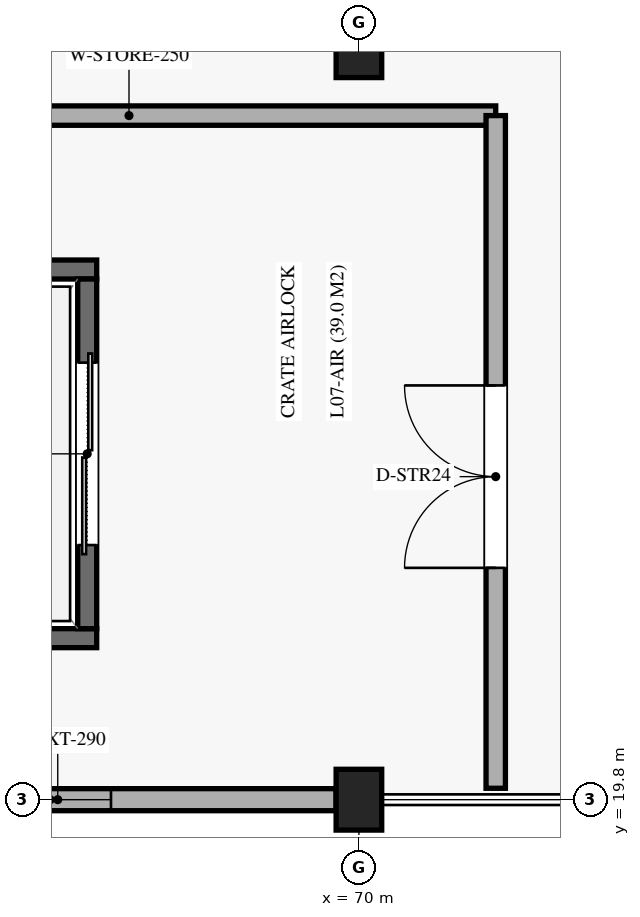
"""IFC4 building model, lengths in metres.
Left out: names, types, materials, properties, quantities, classifications, styles, units other than length and angle.
Written with IfcOpenShell. Run it as: python <this file> out.ifc"""

import sys

from ifc_helpers import new_model, si_unit, direction, frame, frame_2d, origin, origin_2d, place, context, subcontext, project, spatial, rectangle, extrude, element, fill, save


model = new_model("IFC4")
c1 = context("Model", 3, precision=1e-05, world=origin(), true_north=direction((0.0, 1.0)))
c2 = subcontext(c1, "Body", "Model", "MODEL_VIEW")
j1 = project(units=[si_unit("LENGTHUNIT", "METRE"), si_unit("PLANEANGLEUNIT", "RADIAN")], contexts=[c1])
p1 = place(None, origin())
s1 = spatial("IfcSite", under=j1, at=p1, CompositionType="ELEMENT")
p2 = place(p1, origin())
s2 = spatial("IfcBuilding", under=s1, at=p2, CompositionType="ELEMENT")
p3 = place(p2, frame((0.0, 0.0, 37.74)))
s3 = spatial("IfcBuildingStorey", under=s2, at=p3, CompositionType="ELEMENT", Elevation=37.74)
for number, where, z_axis, x_axis in (
    (1, (70.0, 19.8, 0.0), (0.0, 0.0, 1.0), (1.0, 0.0, 0.0)),
    (2, (70.0, 29.7, 0.0), (0.0, 0.0, 1.0), (1.0, 0.0, 0.0)),
):
    element("IfcColumn", number, at=place(p3, frame(where, z_axis=z_axis, x_axis=x_axis)), inside=s3, PredefinedType="COLUMN", context=c2, shape_type="SweptSolid", body=[
        extrude(rectangle(XDim=0.6, YDim=0.8, at=origin_2d()), origin(), (0.0, 0.0, 1.0), 4.59),
    ])
p4 = place(p3, frame((62.375, 19.8, 0.0), z_axis=(0.0, 0.0, 1.0), x_axis=(1.0, 0.0, 0.0)))
e3 = element("IfcWall", 3, at=p4, inside=s3, PredefinedType="SOLIDWALL", context=c2, shape_type="SweptSolid", body=[
    extrude(rectangle(XDim=7.325, YDim=0.29, at=frame_2d((3.663, 0.0))), origin(), (0.0, 0.0, 1.0), 3.53),
])
p5 = place(p4, frame((2.763, 0.0, 1.05)))
e4 = element("IfcOpeningElement", 4, at=p5, cuts=e3, PredefinedType="OPENING", context=c2, shape_type="SweptSolid", body=[
    extrude(rectangle(XDim=1.6, YDim=1.65, at=frame_2d((0.8, 0.825))), frame((0.0, 0.155, 0.0), z_axis=(0.0, -1.0, 0.0), x_axis=(1.0, 0.0, 0.0)), (0.0, 0.0, 1.0), 0.31),
])
for number, where, z_axis, x_axis in (
    (5, (62.65, 21.925, 0.0), (0.0, 0.0, 1.0), (1.0, 0.0, 0.0)),
    (6, (62.65, 26.775, 0.0), (0.0, 0.0, 1.0), (1.0, 0.0, 0.0)),
):
    element("IfcWall", number, at=place(p3, frame(where, z_axis=z_axis, x_axis=x_axis)), inside=s3, PredefinedType="SOLIDWALL", context=c2, shape_type="SweptSolid", body=[
        extrude(rectangle(XDim=3.9, YDim=0.25, at=frame_2d((1.95, 0.0))), origin(), (0.0, 0.0, 1.0), 4.29),
    ])
p6 = place(p3, frame((66.425, 22.05, 0.0), z_axis=(0.0, 0.0, 1.0), x_axis=(0.0, 1.0, 0.0)))
e7 = element("IfcWall", 7, at=p6, inside=s3, PredefinedType="SOLIDWALL", context=c2, shape_type="SweptSolid", body=[
    extrude(rectangle(XDim=4.6, YDim=0.25, at=frame_2d((2.3, 0.0))), origin(), (0.0, 0.0, 1.0), 4.29),
])
p7 = place(p6, frame((1.1, 0.0, 0.0)))
e8 = element("IfcOpeningElement", 8, at=p7, cuts=e7, PredefinedType="OPENING", context=c2, shape_type="SweptSolid", body=[
    extrude(rectangle(XDim=2.4, YDim=2.65, at=frame_2d((1.2, 1.325))), frame((0.0, 0.135, 0.0), z_axis=(0.0, -1.0, 0.0), x_axis=(1.0, 0.0, 0.0)), (0.0, 0.0, 1.0), 0.27),
])
p8 = place(p3, frame((62.15, 28.8, 0.0), z_axis=(0.0, 0.0, 1.0), x_axis=(1.0, 0.0, 0.0)))
e9 = element("IfcWall", 9, at=p8, inside=s3, PredefinedType="SOLIDWALL", context=c2, shape_type="SweptSolid", body=[
    extrude(rectangle(XDim=9.65, YDim=0.255, at=frame_2d((4.825, 0.0))), origin(), (0.0, 0.0, 1.0), 3.43),
])
p9 = place(p3, frame((71.8, 19.95, 0.0), z_axis=(0.0, 0.0, 1.0), x_axis=(0.0, 1.0, 0.0)))
e10 = element("IfcWall", 10, at=p9, inside=s3, PredefinedType="SOLIDWALL", context=c2, shape_type="SweptSolid", body=[
    extrude(rectangle(XDim=8.85, YDim=0.255, at=frame_2d((4.425, 0.0))), origin(), (0.0, 0.0, 1.0), 3.43),
])
p10 = place(p9, frame((2.9, 0.0, 0.0)))
e11 = element("IfcOpeningElement", 11, at=p10, cuts=e10, PredefinedType="OPENING", context=c2, shape_type="SweptSolid", body=[
    extrude(rectangle(XDim=2.4, YDim=2.5, at=frame_2d((1.2, 1.25))), frame((0.0, 0.137, 0.0), z_axis=(0.0, -1.0, 0.0), x_axis=(1.0, 0.0, 0.0)), (0.0, 0.0, 1.0), 0.275),
])
p11 = place(p5, origin())
e12 = element("IfcWindow", 12, at=p11, inside=s3, PartitioningType="SINGLE_PANEL", PredefinedType="WINDOW", context=c2, shape_type="SweptSolid", body=[
    extrude(rectangle(XDim=1.6, YDim=1.65, at=frame_2d((0.8, 0.825))), frame((0.0, 0.03, 0.0), z_axis=(0.0, -1.0, 0.0), x_axis=(1.0, 0.0, 0.0)), (0.0, 0.0, 1.0), 0.06),
])
fill(e4, e12)
p12 = place(p7, origin())
e13 = element("IfcDoor", 13, at=p12, inside=s3, OperationType="DOUBLE_DOOR_SLIDING", PredefinedType="DOOR", context=c2, shape_type="SweptSolid", body=[
    extrude(rectangle(XDim=2.4, YDim=2.65, at=frame_2d((1.2, 1.325))), frame((0.0, 0.025, 0.0), z_axis=(0.0, -1.0, 0.0), x_axis=(1.0, 0.0, 0.0)), (0.0, 0.0, 1.0), 0.05),
])
fill(e8, e13)
p13 = place(p10, origin())
e14 = element("IfcDoor", 14, at=p13, inside=s3, OperationType="DOUBLE_DOOR_SINGLE_SWING", PredefinedType="DOOR", context=c2, shape_type="SweptSolid", body=[
    extrude(rectangle(XDim=2.4, YDim=2.5, at=frame_2d((1.2, 1.25))), frame((0.0, 0.025, 0.0), z_axis=(0.0, -1.0, 0.0), x_axis=(1.0, 0.0, 0.0)), (0.0, 0.0, 1.0), 0.05),
])
fill(e11, e14)
save(model, sys.argv[1])
